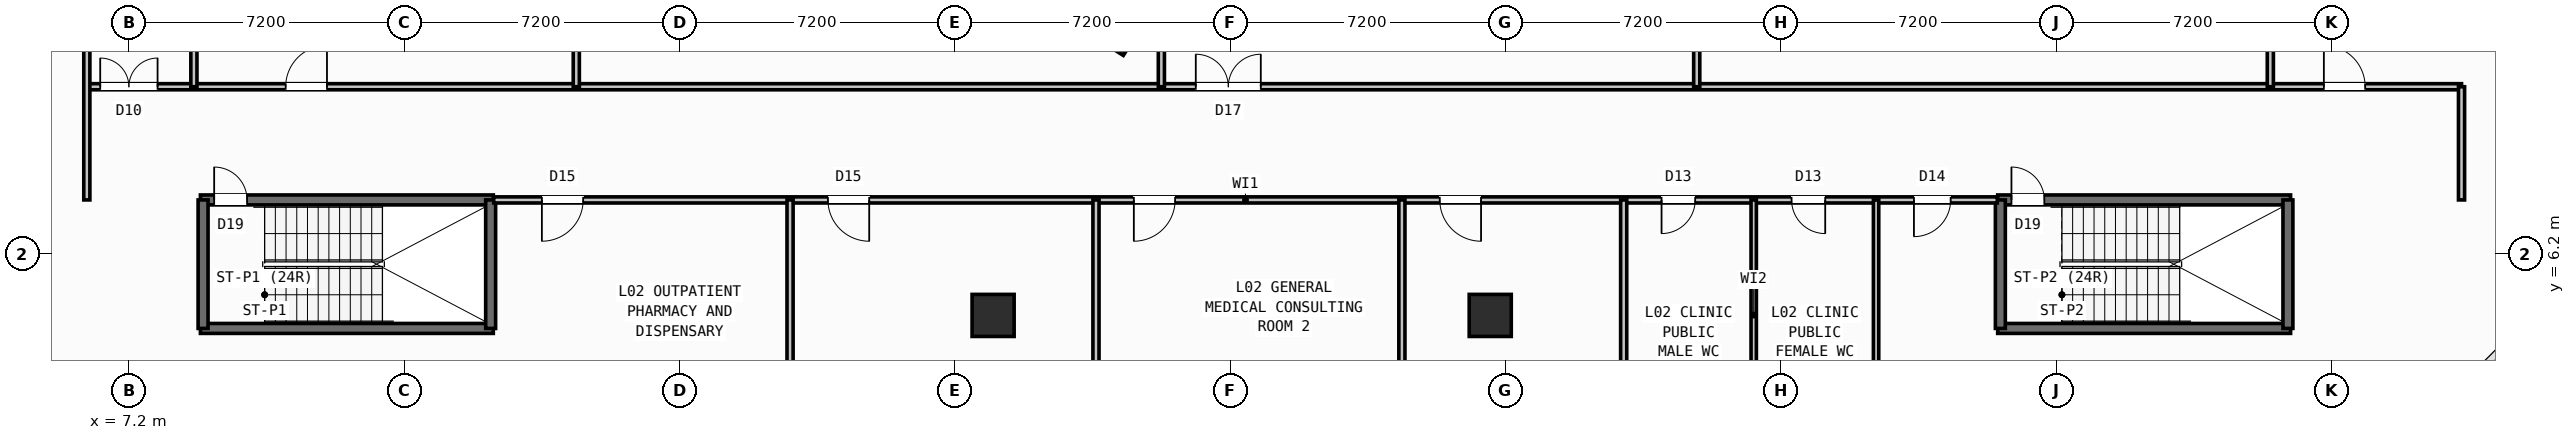
"""IFC4 building model, lengths in metres.
Left out: names, types, materials, properties, quantities, classifications, styles, units other than length and angle.
Written with IfcOpenShell. Run it as: python <this file> out.ifc"""

import sys

from ifc_helpers import new_model, si_unit, direction, frame, frame_2d, origin, origin_2d, place, context, subcontext, project, spatial, rectangle, hollow_rectangle, extrude, source, transform, mapped, element, fill, save


model = new_model("IFC4")
c1 = context("Model", 3, precision=1e-05, world=origin(), true_north=direction((0.0, 1.0)))
c2 = subcontext(c1, "Body", "Model", "MODEL_VIEW")
j1 = project(units=[si_unit("LENGTHUNIT", "METRE"), si_unit("PLANEANGLEUNIT", "RADIAN")], contexts=[c1])
p1 = place(None, origin())
s1 = spatial("IfcSite", under=j1, at=p1, CompositionType="ELEMENT")
p2 = place(p1, origin())
s2 = spatial("IfcBuilding", under=s1, at=p2, CompositionType="ELEMENT")
p3 = place(p2, frame((0.0, 0.0, 10.2)))
s3 = spatial("IfcBuildingStorey", under=s2, at=p3, CompositionType="ELEMENT", Elevation=10.2)
m1 = source(origin(), c2, "Body", "SweptSolid", [
    extrude(hollow_rectangle(XDim=1.1, YDim=1.1, WallThickness=0.04, at=origin_2d()), origin(), (0.0, 0.0, 1.0), 4.2),
])
for number, where, z_axis, x_axis in (
    (1, (29.8, 4.6, 0.0), (0.0, 0.0, 1.0), (1.0, 0.0, 0.0)),
    (2, (42.8, 4.6, 0.0), (0.0, 0.0, 1.0), (1.0, 0.0, 0.0)),
):
    element("IfcColumn", number, at=place(p3, frame(where, z_axis=z_axis, x_axis=x_axis)), inside=s3, PredefinedType="COLUMN", context=c2, shape_type="MappedRepresentation", body=[
        mapped(m1, transform((0.0, 0.0, 0.0), scale=1.0)),
    ])
m2 = source(origin(), c2, "Body", "SweptSolid", [
    extrude(hollow_rectangle(XDim=1.0, YDim=1.0, WallThickness=0.04, at=origin_2d()), origin(), (0.0, 0.0, 1.0), 4.2),
])
p4 = place(p3, frame((33.046, 12.087, 0.0), z_axis=(0.0, 0.0, 1.0), x_axis=(-0.848048096156, 0.529919264233, 0.0)))
e3 = element("IfcColumn", 3, at=p4, inside=s3, PredefinedType="COLUMN", context=c2, shape_type="MappedRepresentation", body=[
    mapped(m2, transform((0.0, 0.0, 0.0), scale=1.0)),
])
p5 = place(p3, frame((9.07, 7.62, 0.0), z_axis=(0.0, 0.0, 1.0), x_axis=(1.0, 0.0, 0.0)))
e4 = element("IfcWall", 4, at=p5, inside=s3, PredefinedType="SHEAR", context=c2, shape_type="SweptSolid", body=[
    extrude(rectangle(XDim=7.66, YDim=0.26, at=frame_2d((3.83, 0.0))), origin(), (0.0, 0.0, 1.0), 4.0),
])
p6 = place(p5, frame((0.36, 0.0, 0.0)))
e5 = element("IfcOpeningElement", 5, at=p6, cuts=e4, PredefinedType="OPENING", context=c2, shape_type="SweptSolid", body=[
    extrude(rectangle(XDim=0.86, YDim=2.05, at=frame_2d((0.43, 1.025))), frame((0.0, 0.14, 0.0), z_axis=(0.0, -1.0, 0.0), x_axis=(1.0, 0.0, 0.0)), (0.0, 0.0, 1.0), 0.28),
])
p7 = place(p3, frame((9.07, 4.26, 0.0), z_axis=(0.0, 0.0, 1.0), x_axis=(1.0, 0.0, 0.0)))
e6 = element("IfcWall", 6, at=p7, inside=s3, PredefinedType="SHEAR", context=c2, shape_type="SweptSolid", body=[
    extrude(rectangle(XDim=7.66, YDim=0.26, at=frame_2d((3.83, 0.0))), origin(), (0.0, 0.0, 1.0), 4.0),
])
for number, where, z_axis, x_axis in (
    (7, (9.14, 4.26, 0.0), (0.0, 0.0, 1.0), (0.0, 1.0, 0.0)),
    (8, (16.66, 4.26, 0.0), (0.0, 0.0, 1.0), (0.0, 1.0, 0.0)),
):
    element("IfcWall", number, at=place(p3, frame(where, z_axis=z_axis, x_axis=x_axis)), inside=s3, PredefinedType="SHEAR", context=c2, shape_type="SweptSolid", body=[
        extrude(rectangle(XDim=3.36, YDim=0.26, at=frame_2d((1.68, 0.0))), origin(), (0.0, 0.0, 1.0), 4.0),
    ])
p8 = place(p3, frame((56.07, 7.62, 0.0), z_axis=(0.0, 0.0, 1.0), x_axis=(1.0, 0.0, 0.0)))
e9 = element("IfcWall", 9, at=p8, inside=s3, PredefinedType="SHEAR", context=c2, shape_type="SweptSolid", body=[
    extrude(rectangle(XDim=7.66, YDim=0.26, at=frame_2d((3.83, 0.0))), origin(), (0.0, 0.0, 1.0), 4.0),
])
p9 = place(p8, frame((0.36, 0.0, 0.0)))
e10 = element("IfcOpeningElement", 10, at=p9, cuts=e9, PredefinedType="OPENING", context=c2, shape_type="SweptSolid", body=[
    extrude(rectangle(XDim=0.86, YDim=2.05, at=frame_2d((0.43, 1.025))), frame((0.0, 0.14, 0.0), z_axis=(0.0, -1.0, 0.0), x_axis=(1.0, 0.0, 0.0)), (0.0, 0.0, 1.0), 0.28),
])
p10 = place(p3, frame((56.07, 4.26, 0.0), z_axis=(0.0, 0.0, 1.0), x_axis=(1.0, 0.0, 0.0)))
e11 = element("IfcWall", 11, at=p10, inside=s3, PredefinedType="SHEAR", context=c2, shape_type="SweptSolid", body=[
    extrude(rectangle(XDim=7.66, YDim=0.26, at=frame_2d((3.83, 0.0))), origin(), (0.0, 0.0, 1.0), 4.0),
])
for number, where, z_axis, x_axis in (
    (12, (56.14, 4.26, 0.0), (0.0, 0.0, 1.0), (0.0, 1.0, 0.0)),
    (13, (63.66, 4.26, 0.0), (0.0, 0.0, 1.0), (0.0, 1.0, 0.0)),
):
    element("IfcWall", number, at=place(p3, frame(where, z_axis=z_axis, x_axis=x_axis)), inside=s3, PredefinedType="SHEAR", context=c2, shape_type="SweptSolid", body=[
        extrude(rectangle(XDim=3.36, YDim=0.26, at=frame_2d((1.68, 0.0))), origin(), (0.0, 0.0, 1.0), 4.0),
    ])
p11 = place(p3, frame((6.1, 10.58, 0.0), z_axis=(0.0, 0.0, 1.0), x_axis=(1.0, 0.0, 0.0)))
e14 = element("IfcWall", 14, at=p11, inside=s3, PredefinedType="PARTITIONING", context=c2, shape_type="SweptSolid", body=[
    extrude(rectangle(XDim=62.1, YDim=0.16, at=frame_2d((31.05, 0.0))), origin(), (0.0, 0.0, 1.0), 3.84),
])
p12 = place(p11, frame((29.0, 0.0, 0.0)))
e15 = element("IfcOpeningElement", 15, at=p12, cuts=e14, PredefinedType="OPENING", context=c2, shape_type="SweptSolid", body=[
    extrude(rectangle(XDim=1.7, YDim=2.2, at=frame_2d((0.85, 1.1))), frame((0.0, 0.09, 0.0), z_axis=(0.0, -1.0, 0.0), x_axis=(1.0, 0.0, 0.0)), (0.0, 0.0, 1.0), 0.18),
])
p13 = place(p11, frame((0.35, 0.0, 0.0)))
e16 = element("IfcOpeningElement", 16, at=p13, cuts=e14, PredefinedType="OPENING", context=c2, shape_type="SweptSolid", body=[
    extrude(rectangle(XDim=1.5, YDim=2.15, at=frame_2d((0.75, 1.075))), frame((0.0, 0.09, 0.0), z_axis=(0.0, -1.0, 0.0), x_axis=(1.0, 0.0, 0.0)), (0.0, 0.0, 1.0), 0.18),
])
p14 = place(p11, frame((5.2, 0.0, 0.0)))
e17 = element("IfcOpeningElement", 17, at=p14, cuts=e14, PredefinedType="OPENING", context=c2, shape_type="SweptSolid", body=[
    extrude(rectangle(XDim=1.08, YDim=2.15, at=frame_2d((0.54, 1.075))), frame((0.0, 0.09, 0.0), z_axis=(0.0, -1.0, 0.0), x_axis=(1.0, 0.0, 0.0)), (0.0, 0.0, 1.0), 0.18),
])
p15 = place(p11, frame((58.5, 0.0, 0.0)))
e18 = element("IfcOpeningElement", 18, at=p15, cuts=e14, PredefinedType="OPENING", context=c2, shape_type="SweptSolid", body=[
    extrude(rectangle(XDim=1.08, YDim=2.15, at=frame_2d((0.54, 1.075))), frame((0.0, 0.09, 0.0), z_axis=(0.0, -1.0, 0.0), x_axis=(1.0, 0.0, 0.0)), (0.0, 0.0, 1.0), 0.18),
])
p16 = place(p3, frame((16.74, 7.62, 0.0), z_axis=(0.0, 0.0, 1.0), x_axis=(1.0, 0.0, 0.0)))
e19 = element("IfcWall", 19, at=p16, inside=s3, PredefinedType="PARTITIONING", context=c2, shape_type="SweptSolid", body=[
    extrude(rectangle(XDim=39.32, YDim=0.16, at=frame_2d((19.66, 0.0))), origin(), (0.0, 0.0, 1.0), 3.84),
])
p17 = place(p16, frame((1.26, 0.0, 0.0)))
e20 = element("IfcOpeningElement", 20, at=p17, cuts=e19, PredefinedType="OPENING", context=c2, shape_type="SweptSolid", body=[
    extrude(rectangle(XDim=1.08, YDim=2.15, at=frame_2d((0.54, 1.075))), frame((0.0, 0.09, 0.0), z_axis=(0.0, -1.0, 0.0), x_axis=(1.0, 0.0, 0.0)), (0.0, 0.0, 1.0), 0.18),
])
p18 = place(p16, frame((8.74, 0.0, 0.0)))
e21 = element("IfcOpeningElement", 21, at=p18, cuts=e19, PredefinedType="OPENING", context=c2, shape_type="SweptSolid", body=[
    extrude(rectangle(XDim=1.08, YDim=2.15, at=frame_2d((0.54, 1.075))), frame((0.0, 0.09, 0.0), z_axis=(0.0, -1.0, 0.0), x_axis=(1.0, 0.0, 0.0)), (0.0, 0.0, 1.0), 0.18),
])
p19 = place(p16, frame((16.74, 0.0, 0.0)))
e22 = element("IfcOpeningElement", 22, at=p19, cuts=e19, PredefinedType="OPENING", context=c2, shape_type="SweptSolid", body=[
    extrude(rectangle(XDim=1.08, YDim=2.15, at=frame_2d((0.54, 1.075))), frame((0.0, 0.09, 0.0), z_axis=(0.0, -1.0, 0.0), x_axis=(1.0, 0.0, 0.0)), (0.0, 0.0, 1.0), 0.18),
])
p20 = place(p16, frame((24.74, 0.0, 0.0)))
e23 = element("IfcOpeningElement", 23, at=p20, cuts=e19, PredefinedType="OPENING", context=c2, shape_type="SweptSolid", body=[
    extrude(rectangle(XDim=1.08, YDim=2.15, at=frame_2d((0.54, 1.075))), frame((0.0, 0.09, 0.0), z_axis=(0.0, -1.0, 0.0), x_axis=(1.0, 0.0, 0.0)), (0.0, 0.0, 1.0), 0.18),
])
p21 = place(p16, frame((30.54, 0.0, 0.0)))
e24 = element("IfcOpeningElement", 24, at=p21, cuts=e19, PredefinedType="OPENING", context=c2, shape_type="SweptSolid", body=[
    extrude(rectangle(XDim=0.88, YDim=2.08, at=frame_2d((0.44, 1.04))), frame((0.0, 0.09, 0.0), z_axis=(0.0, -1.0, 0.0), x_axis=(1.0, 0.0, 0.0)), (0.0, 0.0, 1.0), 0.18),
])
p22 = place(p16, frame((33.94, 0.0, 0.0)))
e25 = element("IfcOpeningElement", 25, at=p22, cuts=e19, PredefinedType="OPENING", context=c2, shape_type="SweptSolid", body=[
    extrude(rectangle(XDim=0.88, YDim=2.08, at=frame_2d((0.44, 1.04))), frame((0.0, 0.09, 0.0), z_axis=(0.0, -1.0, 0.0), x_axis=(1.0, 0.0, 0.0)), (0.0, 0.0, 1.0), 0.18),
])
p23 = place(p16, frame((37.14, 0.0, 0.0)))
e26 = element("IfcOpeningElement", 26, at=p23, cuts=e19, PredefinedType="OPENING", context=c2, shape_type="SweptSolid", body=[
    extrude(rectangle(XDim=0.96, YDim=2.08, at=frame_2d((0.48, 1.04))), frame((0.0, 0.09, 0.0), z_axis=(0.0, -1.0, 0.0), x_axis=(1.0, 0.0, 0.0)), (0.0, 0.0, 1.0), 0.18),
])
p24 = place(p3, frame((34.2, 10.58, 0.0), z_axis=(0.0, 0.0, 1.0), x_axis=(0.0, 1.0, 0.0)))
e27 = element("IfcWall", 27, at=p24, inside=s3, PredefinedType="PARTITIONING", context=c2, shape_type="SweptSolid", body=[
    extrude(rectangle(XDim=3.085, YDim=0.16, at=frame_2d((1.543, 0.0))), origin(), (0.0, 0.0, 1.0), 3.84),
])
p25 = place(p3, frame((48.2, 10.58, 0.0), z_axis=(0.0, 0.0, 1.0), x_axis=(0.0, 1.0, 0.0)))
e28 = element("IfcWall", 28, at=p25, inside=s3, PredefinedType="PARTITIONING", context=c2, shape_type="SweptSolid", body=[
    extrude(rectangle(XDim=5.22, YDim=0.16, at=frame_2d((2.61, 0.0))), origin(), (0.0, 0.0, 1.0), 3.84),
])
for number, where, z_axis, x_axis in (
    (29, (24.49, 1.6, 0.0), (0.0, 0.0, 1.0), (0.0, 1.0, 0.0)),
    (30, (32.49, 1.6, 0.0), (0.0, 0.0, 1.0), (0.0, 1.0, 0.0)),
    (31, (40.49, 1.6, 0.0), (0.0, 0.0, 1.0), (0.0, 1.0, 0.0)),
    (32, (46.29, 1.6, 0.0), (0.0, 0.0, 1.0), (0.0, 1.0, 0.0)),
):
    element("IfcWall", number, at=place(p3, frame(where, z_axis=z_axis, x_axis=x_axis)), inside=s3, PredefinedType="PARTITIONING", context=c2, shape_type="SweptSolid", body=[
        extrude(rectangle(XDim=6.02, YDim=0.16, at=frame_2d((3.01, 0.0))), origin(), (0.0, 0.0, 1.0), 3.84),
    ])
for number, where, z_axis, x_axis in (
    (33, (49.69, 1.6, 0.0), (0.0, 0.0, 1.0), (0.0, 1.0, 0.0)),
    (34, (52.89, 1.6, 0.0), (0.0, 0.0, 1.0), (0.0, 1.0, 0.0)),
):
    element("IfcWall", number, at=place(p3, frame(where, z_axis=z_axis, x_axis=x_axis)), inside=s3, PredefinedType="PLUMBINGWALL", context=c2, shape_type="SweptSolid", body=[
        extrude(rectangle(XDim=6.02, YDim=0.14, at=frame_2d((3.01, 0.0))), origin(), (0.0, 0.0, 1.0), 3.84),
    ])
p26 = place(p3, frame((6.1, 7.62, 0.0), z_axis=(0.0, 0.0, 1.0), x_axis=(0.0, 1.0, 0.0)))
e35 = element("IfcWall", 35, at=p26, inside=s3, PredefinedType="PARTITIONING", context=c2, shape_type="SweptSolid", body=[
    extrude(rectangle(XDim=20.67, YDim=0.16, at=frame_2d((10.335, 0.0))), origin(), (0.0, 0.0, 1.0), 3.84),
])
for number, where, z_axis, x_axis in (
    (36, (8.9, 10.58, 0.0), (0.0, 0.0, 1.0), (0.0, 1.0, 0.0)),
    (37, (18.9, 10.58, 0.0), (0.0, 0.0, 1.0), (0.0, 1.0, 0.0)),
):
    element("IfcWall", number, at=place(p3, frame(where, z_axis=z_axis, x_axis=x_axis)), inside=s3, PredefinedType="PARTITIONING", context=c2, shape_type="SweptSolid", body=[
        extrude(rectangle(XDim=24.57, YDim=0.16, at=frame_2d((12.285, 0.0))), origin(), (0.0, 0.0, 1.0), 3.84),
    ])
p27 = place(p3, frame((63.2, 10.58, 0.0), z_axis=(0.0, 0.0, 1.0), x_axis=(0.0, 1.0, 0.0)))
e38 = element("IfcWall", 38, at=p27, inside=s3, PredefinedType="PARTITIONING", context=c2, shape_type="SweptSolid", body=[
    extrude(rectangle(XDim=18.147, YDim=0.16, at=frame_2d((9.073, 0.0))), origin(), (0.0, 0.0, 1.0), 3.84),
])
p28 = place(p3, frame((68.2, 7.62, 0.0), z_axis=(0.0, 0.0, 1.0), x_axis=(0.0, 1.0, 0.0)))
e39 = element("IfcWall", 39, at=p28, inside=s3, PredefinedType="PARTITIONING", context=c2, shape_type="SweptSolid", body=[
    extrude(rectangle(XDim=2.96, YDim=0.16, at=frame_2d((1.48, 0.0))), origin(), (0.0, 0.0, 1.0), 3.84),
])
m3 = source(origin(), c2, "Body", "SweptSolid", [
    extrude(rectangle(XDim=0.86, YDim=2.05, at=frame_2d((0.43, 1.025))), frame((0.0, 0.025, 0.0), z_axis=(0.0, -1.0, 0.0), x_axis=(1.0, 0.0, 0.0)), (0.0, 0.0, 1.0), 0.05),
])
p29 = place(p6, origin())
e40 = element("IfcDoor", 40, at=p29, inside=s3, OperationType="SINGLE_SWING_LEFT", PredefinedType="DOOR", context=c2, shape_type="MappedRepresentation", body=[
    mapped(m3, transform((0.0, 0.0, 0.0), scale=1.0)),
])
fill(e5, e40)
p30 = place(p9, origin())
e41 = element("IfcDoor", 41, at=p30, inside=s3, OperationType="SINGLE_SWING_LEFT", PredefinedType="DOOR", context=c2, shape_type="MappedRepresentation", body=[
    mapped(m3, transform((0.0, 0.0, 0.0), scale=1.0)),
])
fill(e10, e41)
m4 = source(origin(), c2, "Body", "SweptSolid", [
    extrude(rectangle(XDim=1.7, YDim=2.2, at=frame_2d((0.85, 1.1))), frame((0.0, 0.025, 0.0), z_axis=(0.0, -1.0, 0.0), x_axis=(1.0, 0.0, 0.0)), (0.0, 0.0, 1.0), 0.05),
])
p31 = place(p12, origin())
e42 = element("IfcDoor", 42, at=p31, inside=s3, OperationType="DOUBLE_DOOR_SINGLE_SWING", PredefinedType="DOOR", context=c2, shape_type="MappedRepresentation", body=[
    mapped(m4, transform((0.0, 0.0, 0.0), scale=1.0)),
])
fill(e15, e42)
m5 = source(origin(), c2, "Body", "SweptSolid", [
    extrude(rectangle(XDim=1.08, YDim=2.15, at=frame_2d((0.54, 1.075))), frame((0.0, 0.025, 0.0), z_axis=(0.0, -1.0, 0.0), x_axis=(1.0, 0.0, 0.0)), (0.0, 0.0, 1.0), 0.05),
])
p32 = place(p17, frame((1.08, 0.0, 0.0), z_axis=(0.0, 0.0, 1.0), x_axis=(-1.0, 0.0, 0.0)))
e43 = element("IfcDoor", 43, at=p32, inside=s3, OperationType="SINGLE_SWING_RIGHT", PredefinedType="DOOR", context=c2, shape_type="MappedRepresentation", body=[
    mapped(m5, transform((0.0, 0.0, 0.0), scale=1.0)),
])
fill(e20, e43)
p33 = place(p18, frame((1.08, 0.0, 0.0), z_axis=(0.0, 0.0, 1.0), x_axis=(-1.0, 0.0, 0.0)))
e44 = element("IfcDoor", 44, at=p33, inside=s3, OperationType="SINGLE_SWING_LEFT", PredefinedType="DOOR", context=c2, shape_type="MappedRepresentation", body=[
    mapped(m5, transform((0.0, 0.0, 0.0), scale=1.0)),
])
fill(e21, e44)
p34 = place(p19, frame((1.08, 0.0, 0.0), z_axis=(0.0, 0.0, 1.0), x_axis=(-1.0, 0.0, 0.0)))
e45 = element("IfcDoor", 45, at=p34, inside=s3, OperationType="SINGLE_SWING_RIGHT", PredefinedType="DOOR", context=c2, shape_type="MappedRepresentation", body=[
    mapped(m5, transform((0.0, 0.0, 0.0), scale=1.0)),
])
fill(e22, e45)
p35 = place(p20, frame((1.08, 0.0, 0.0), z_axis=(0.0, 0.0, 1.0), x_axis=(-1.0, 0.0, 0.0)))
e46 = element("IfcDoor", 46, at=p35, inside=s3, OperationType="SINGLE_SWING_LEFT", PredefinedType="DOOR", context=c2, shape_type="MappedRepresentation", body=[
    mapped(m5, transform((0.0, 0.0, 0.0), scale=1.0)),
])
fill(e23, e46)
m6 = source(origin(), c2, "Body", "SweptSolid", [
    extrude(rectangle(XDim=0.88, YDim=2.08, at=frame_2d((0.44, 1.04))), frame((0.0, 0.025, 0.0), z_axis=(0.0, -1.0, 0.0), x_axis=(1.0, 0.0, 0.0)), (0.0, 0.0, 1.0), 0.05),
])
p36 = place(p21, frame((0.88, 0.0, 0.0), z_axis=(0.0, 0.0, 1.0), x_axis=(-1.0, 0.0, 0.0)))
e47 = element("IfcDoor", 47, at=p36, inside=s3, OperationType="SINGLE_SWING_RIGHT", PredefinedType="DOOR", context=c2, shape_type="MappedRepresentation", body=[
    mapped(m6, transform((0.0, 0.0, 0.0), scale=1.0)),
])
fill(e24, e47)
p37 = place(p22, frame((0.88, 0.0, 0.0), z_axis=(0.0, 0.0, 1.0), x_axis=(-1.0, 0.0, 0.0)))
e48 = element("IfcDoor", 48, at=p37, inside=s3, OperationType="SINGLE_SWING_LEFT", PredefinedType="DOOR", context=c2, shape_type="MappedRepresentation", body=[
    mapped(m6, transform((0.0, 0.0, 0.0), scale=1.0)),
])
fill(e25, e48)
m7 = source(origin(), c2, "Body", "SweptSolid", [
    extrude(rectangle(XDim=0.96, YDim=2.08, at=frame_2d((0.48, 1.04))), frame((0.0, 0.025, 0.0), z_axis=(0.0, -1.0, 0.0), x_axis=(1.0, 0.0, 0.0)), (0.0, 0.0, 1.0), 0.05),
])
p38 = place(p23, frame((0.96, 0.0, 0.0), z_axis=(0.0, 0.0, 1.0), x_axis=(-1.0, 0.0, 0.0)))
e49 = element("IfcDoor", 49, at=p38, inside=s3, OperationType="SINGLE_SWING_RIGHT", PredefinedType="DOOR", context=c2, shape_type="MappedRepresentation", body=[
    mapped(m7, transform((0.0, 0.0, 0.0), scale=1.0)),
])
fill(e26, e49)
m8 = source(origin(), c2, "Body", "SweptSolid", [
    extrude(rectangle(XDim=1.5, YDim=2.15, at=frame_2d((0.75, 1.075))), frame((0.0, 0.025, 0.0), z_axis=(0.0, -1.0, 0.0), x_axis=(1.0, 0.0, 0.0)), (0.0, 0.0, 1.0), 0.05),
])
p39 = place(p13, origin())
e50 = element("IfcDoor", 50, at=p39, inside=s3, OperationType="DOUBLE_DOOR_SINGLE_SWING", PredefinedType="DOOR", context=c2, shape_type="MappedRepresentation", body=[
    mapped(m8, transform((0.0, 0.0, 0.0), scale=1.0)),
])
fill(e16, e50)
p40 = place(p14, origin())
e51 = element("IfcDoor", 51, at=p40, inside=s3, OperationType="SINGLE_SWING_RIGHT", PredefinedType="DOOR", context=c2, shape_type="MappedRepresentation", body=[
    mapped(m5, transform((0.0, 0.0, 0.0), scale=1.0)),
])
fill(e17, e51)
p41 = place(p15, origin())
e52 = element("IfcDoor", 52, at=p41, inside=s3, OperationType="SINGLE_SWING_LEFT", PredefinedType="DOOR", context=c2, shape_type="MappedRepresentation", body=[
    mapped(m5, transform((0.0, 0.0, 0.0), scale=1.0)),
])
fill(e18, e52)
save(model, sys.argv[1])
